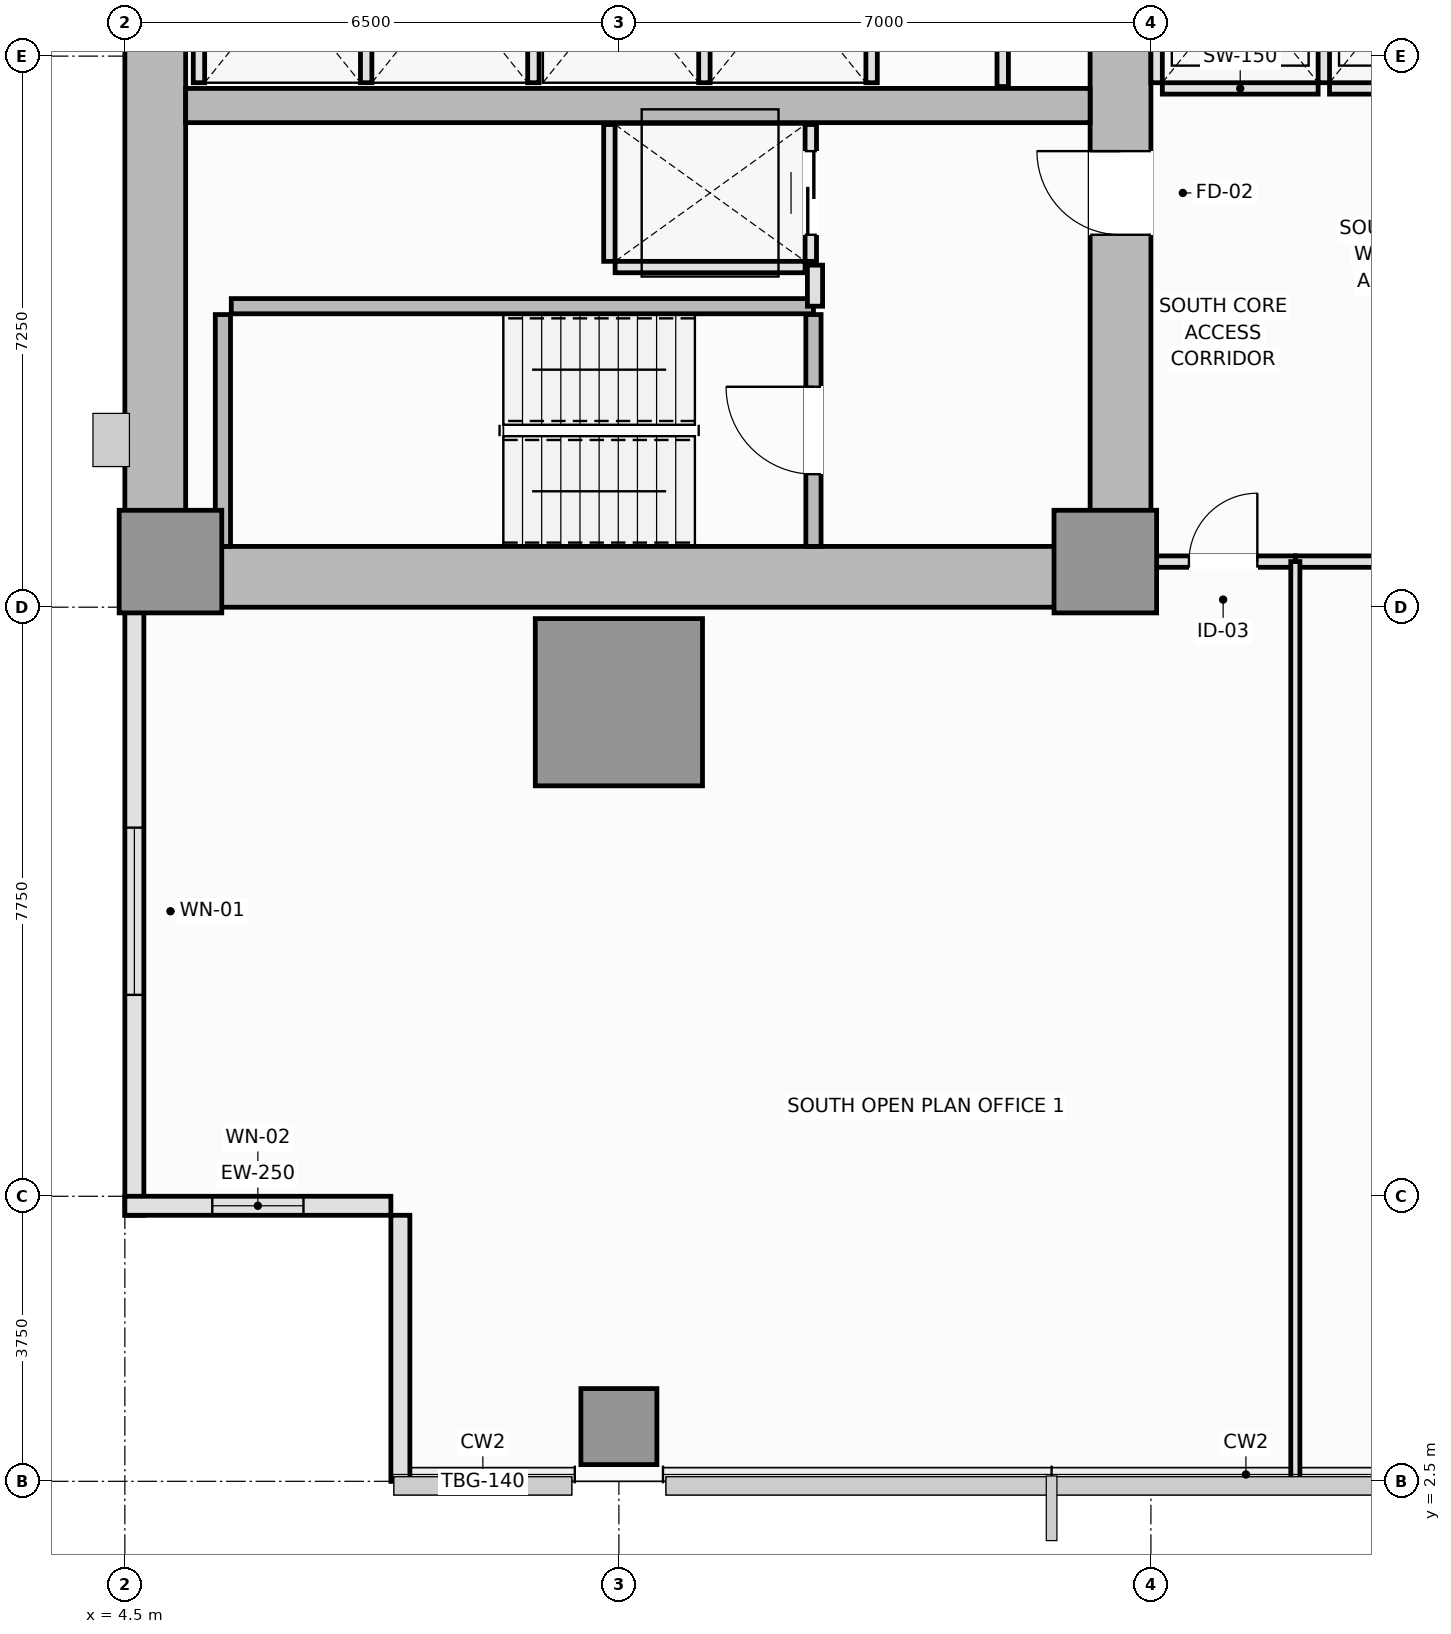
"""IFC4 building model, lengths in metres.
Left out: names, types, materials, properties, quantities, classifications, styles, units other than length and angle.
Written with IfcOpenShell. Run it as: python <this file> out.ifc"""

import sys

from ifc_helpers import new_model, si_unit, direction, frame, frame_2d, origin, origin_2d, place, context, subcontext, project, spatial, rectangle, extrude, element, fill, save


model = new_model("IFC4")
c1 = context("Model", 3, precision=1e-05, world=origin(), true_north=direction((0.0, 1.0)))
c2 = subcontext(c1, "Body", "Model", "MODEL_VIEW")
j1 = project(units=[si_unit("LENGTHUNIT", "METRE"), si_unit("PLANEANGLEUNIT", "RADIAN")], contexts=[c1])
p1 = place(None, origin())
s1 = spatial("IfcSite", under=j1, at=p1, CompositionType="ELEMENT")
p2 = place(p1, origin())
s2 = spatial("IfcBuilding", under=s1, at=p2, CompositionType="ELEMENT")
p3 = place(p2, frame((0.0, 0.0, 57.55)))
s3 = spatial("IfcBuildingStorey", under=s2, at=p3, CompositionType="ELEMENT", Elevation=57.55)
p4 = place(p3, frame((4.5, 14.4, 0.0), z_axis=(0.0, 0.0, 1.0), x_axis=(1.0, 0.0, 0.0)))
e1 = element("IfcWall", 1, at=p4, inside=s3, PredefinedType="SHEAR", context=c2, shape_type="SweptSolid", body=[
    extrude(rectangle(XDim=13.5, YDim=0.8, at=frame_2d((6.75, 0.0))), origin(), (0.0, 0.0, 1.0), 3.55),
])
p5 = place(p3, frame((4.9, 14.8, 0.0), z_axis=(0.0, 0.0, 1.0), x_axis=(0.0, 1.0, 0.0)))
e2 = element("IfcWall", 2, at=p5, inside=s3, PredefinedType="SHEAR", context=c2, shape_type="SweptSolid", body=[
    extrude(rectangle(XDim=20.9, YDim=0.8, at=frame_2d((10.45, 0.0))), origin(), (0.0, 0.0, 1.0), 3.55),
])
p6 = place(p3, frame((17.6, 14.8, 0.0), z_axis=(0.0, 0.0, 1.0), x_axis=(0.0, 1.0, 0.0)))
e3 = element("IfcWall", 3, at=p6, inside=s3, PredefinedType="SHEAR", context=c2, shape_type="SweptSolid", body=[
    extrude(rectangle(XDim=8.65, YDim=0.8, at=frame_2d((4.325, 0.0))), origin(), (0.0, 0.0, 1.0), 3.55),
])
p7 = place(p6, frame((4.1, 0.0, 0.0)))
e4 = element("IfcOpeningElement", 4, at=p7, cuts=e3, PredefinedType="OPENING", context=c2, shape_type="SweptSolid", body=[
    extrude(rectangle(XDim=1.1, YDim=2.15, at=frame_2d((0.55, 1.075))), frame((0.0, 0.41, 0.0), z_axis=(0.0, -1.0, 0.0), x_axis=(1.0, 0.0, 0.0)), (0.0, 0.0, 1.0), 0.82),
])
p8 = place(p3, frame((5.3, 20.6, 0.0), z_axis=(0.0, 0.0, 1.0), x_axis=(1.0, 0.0, 0.0)))
e5 = element("IfcWall", 5, at=p8, inside=s3, PredefinedType="SHEAR", context=c2, shape_type="SweptSolid", body=[
    extrude(rectangle(XDim=11.9, YDim=0.45, at=frame_2d((5.95, 0.0))), origin(), (0.0, 0.0, 1.0), 3.55),
])
for number, where, z_axis, x_axis in (
    (6, (5.1, 14.6, 0.0), (0.0, 0.0, 1.0), (1.0, 0.0, 0.0)),
    (7, (17.4, 14.6, 0.0), (0.0, 0.0, 1.0), (1.0, 0.0, 0.0)),
):
    element("IfcColumn", number, at=place(p3, frame(where, z_axis=z_axis, x_axis=x_axis)), inside=s3, PredefinedType="PILASTER", context=c2, shape_type="SweptSolid", body=[
        extrude(rectangle(XDim=1.35, YDim=1.35, at=origin_2d()), origin(), (0.0, 0.0, 1.0), 3.55),
    ])
p9 = place(p3, frame((11.0, 12.75, 0.0), z_axis=(0.0, 0.0, 1.0), x_axis=(1.0, 0.0, 0.0)))
e8 = element("IfcColumn", 8, at=p9, inside=s3, PredefinedType="COLUMN", context=c2, shape_type="SweptSolid", body=[
    extrude(rectangle(XDim=2.2, YDim=2.2, at=origin_2d()), origin(), (0.0, 0.0, 1.0), 3.55),
])
p10 = place(p3, frame((11.0, 3.22, 0.0), z_axis=(0.0, 0.0, 1.0), x_axis=(1.0, 0.0, 0.0)))
e9 = element("IfcColumn", 9, at=p10, inside=s3, PredefinedType="COLUMN", context=c2, shape_type="SweptSolid", body=[
    extrude(rectangle(XDim=1.0, YDim=1.0, at=origin_2d()), origin(), (0.0, 0.0, 1.0), 3.55),
])
p11 = place(p3, frame((4.625, 14.0, 0.0), z_axis=(0.0, 0.0, 1.0), x_axis=(0.0, -1.0, 0.0)))
e10 = element("IfcWall", 10, at=p11, inside=s3, PredefinedType="SOLIDWALL", context=c2, shape_type="SweptSolid", body=[
    extrude(rectangle(XDim=8.0, YDim=0.25, at=frame_2d((4.0, 0.0))), origin(), (0.0, 0.0, 1.0), 3.37),
])
p12 = place(p11, frame((2.9, 0.0, 0.9)))
e11 = element("IfcOpeningElement", 11, at=p12, cuts=e10, PredefinedType="OPENING", context=c2, shape_type="SweptSolid", body=[
    extrude(rectangle(XDim=2.2, YDim=1.8, at=frame_2d((1.1, 0.9))), frame((0.0, 0.135, 0.0), z_axis=(0.0, -1.0, 0.0), x_axis=(1.0, 0.0, 0.0)), (0.0, 0.0, 1.0), 0.27),
])
p13 = place(p3, frame((4.5, 6.125, 0.0), z_axis=(0.0, 0.0, 1.0), x_axis=(1.0, 0.0, 0.0)))
e12 = element("IfcWall", 12, at=p13, inside=s3, PredefinedType="SOLIDWALL", context=c2, shape_type="SweptSolid", body=[
    extrude(rectangle(XDim=3.5, YDim=0.25, at=frame_2d((1.75, 0.0))), origin(), (0.0, 0.0, 1.0), 3.37),
])
p14 = place(p13, frame((1.15, 0.0, 0.9)))
e13 = element("IfcOpeningElement", 13, at=p14, cuts=e12, PredefinedType="OPENING", context=c2, shape_type="SweptSolid", body=[
    extrude(rectangle(XDim=1.2, YDim=1.8, at=frame_2d((0.6, 0.9))), frame((0.0, 0.135, 0.0), z_axis=(0.0, -1.0, 0.0), x_axis=(1.0, 0.0, 0.0)), (0.0, 0.0, 1.0), 0.27),
])
p15 = place(p3, frame((8.125, 6.0, 0.0), z_axis=(0.0, 0.0, 1.0), x_axis=(0.0, -1.0, 0.0)))
e14 = element("IfcWall", 14, at=p15, inside=s3, PredefinedType="SOLIDWALL", context=c2, shape_type="SweptSolid", body=[
    extrude(rectangle(XDim=3.5, YDim=0.25, at=frame_2d((1.75, 0.0))), origin(), (0.0, 0.0, 1.0), 3.37),
])
p16 = place(p3, frame((5.79, 14.8, 0.0), z_axis=(0.0, 0.0, 1.0), x_axis=(0.0, 1.0, 0.0)))
e15 = element("IfcWall", 15, at=p16, inside=s3, PredefinedType="SOLIDWALL", context=c2, shape_type="SweptSolid", body=[
    extrude(rectangle(XDim=3.05, YDim=0.2, at=frame_2d((1.525, 0.0))), origin(), (0.0, 0.0, 1.0), 3.55),
])
p17 = place(p3, frame((5.9, 17.96, 0.0), z_axis=(0.0, 0.0, 1.0), x_axis=(1.0, 0.0, 0.0)))
e16 = element("IfcWall", 16, at=p17, inside=s3, PredefinedType="SOLIDWALL", context=c2, shape_type="SweptSolid", body=[
    extrude(rectangle(XDim=7.66, YDim=0.2, at=frame_2d((3.83, 0.0))), origin(), (0.0, 0.0, 1.0), 3.55),
])
p18 = place(p3, frame((13.56, 14.8, 0.0), z_axis=(0.0, 0.0, 1.0), x_axis=(0.0, 1.0, 0.0)))
e17 = element("IfcWall", 17, at=p18, inside=s3, PredefinedType="SOLIDWALL", context=c2, shape_type="SweptSolid", body=[
    extrude(rectangle(XDim=3.05, YDim=0.2, at=frame_2d((1.525, 0.0))), origin(), (0.0, 0.0, 1.0), 3.55),
])
p19 = place(p18, frame((0.95, 0.0, 0.0)))
e18 = element("IfcOpeningElement", 18, at=p19, cuts=e17, PredefinedType="OPENING", context=c2, shape_type="SweptSolid", body=[
    extrude(rectangle(XDim=1.15, YDim=2.15, at=frame_2d((0.575, 1.075))), frame((0.0, 0.11, 0.0), z_axis=(0.0, -1.0, 0.0), x_axis=(1.0, 0.0, 0.0)), (0.0, 0.0, 1.0), 0.22),
])
p20 = place(p3, frame((18.15, 20.825, 0.0), z_axis=(0.0, 0.0, 1.0), x_axis=(1.0, 0.0, 0.0)))
e19 = element("IfcWall", 19, at=p20, inside=s3, PredefinedType="PARTITIONING", context=c2, shape_type="SweptSolid", body=[
    extrude(rectangle(XDim=2.05, YDim=0.15, at=frame_2d((1.025, 0.0))), origin(), (0.0, 0.0, 1.0), 3.37),
])
for number, where, z_axis, x_axis in (
    (20, (18.075, 20.9, 0.0), (0.0, 0.0, 1.0), (0.0, 1.0, 0.0)),
    (21, (20.275, 20.9, 0.0), (0.0, 0.0, 1.0), (0.0, 1.0, 0.0)),
):
    element("IfcWall", number, at=place(p3, frame(where, z_axis=z_axis, x_axis=x_axis)), inside=s3, PredefinedType="PARTITIONING", context=c2, shape_type="SweptSolid", body=[
        extrude(rectangle(XDim=2.55, YDim=0.15, at=frame_2d((1.275, 0.0))), origin(), (0.0, 0.0, 1.0), 3.37),
    ])
p21 = place(p3, frame((20.35, 20.825, 0.0), z_axis=(0.0, 0.0, 1.0), x_axis=(1.0, 0.0, 0.0)))
e22 = element("IfcWall", 22, at=p21, inside=s3, PredefinedType="PARTITIONING", context=c2, shape_type="SweptSolid", body=[
    extrude(rectangle(XDim=2.05, YDim=0.15, at=frame_2d((1.025, 0.0))), origin(), (0.0, 0.0, 1.0), 3.37),
])
for number, where, z_axis, x_axis in (
    (23, (5.475, 20.9, 0.0), (0.0, 0.0, 1.0), (0.0, 1.0, 0.0)),
    (24, (7.675, 20.9, 0.0), (0.0, 0.0, 1.0), (0.0, 1.0, 0.0)),
    (25, (9.875, 20.9, 0.0), (0.0, 0.0, 1.0), (0.0, 1.0, 0.0)),
    (26, (12.125, 20.9, 0.0), (0.0, 0.0, 1.0), (0.0, 1.0, 0.0)),
    (27, (14.325, 20.9, 0.0), (0.0, 0.0, 1.0), (0.0, 1.0, 0.0)),
):
    element("IfcWall", number, at=place(p3, frame(where, z_axis=z_axis, x_axis=x_axis)), inside=s3, PredefinedType="PARTITIONING", context=c2, shape_type="SweptSolid", body=[
        extrude(rectangle(XDim=2.55, YDim=0.15, at=frame_2d((1.275, 0.0))), origin(), (0.0, 0.0, 1.0), 3.37),
    ])
p22 = place(p3, frame((10.95, 18.475, 0.0), z_axis=(0.0, 0.0, 1.0), x_axis=(1.0, 0.0, 0.0)))
e28 = element("IfcWall", 28, at=p22, inside=s3, PredefinedType="PARTITIONING", context=c2, shape_type="SweptSolid", body=[
    extrude(rectangle(XDim=2.5, YDim=0.15, at=frame_2d((1.25, 0.0))), origin(), (0.0, 0.0, 1.0), 3.37),
])
p23 = place(p3, frame((10.875, 18.55, 0.0), z_axis=(0.0, 0.0, 1.0), x_axis=(0.0, 1.0, 0.0)))
e29 = element("IfcWall", 29, at=p23, inside=s3, PredefinedType="PARTITIONING", context=c2, shape_type="SweptSolid", body=[
    extrude(rectangle(XDim=1.8, YDim=0.15, at=frame_2d((0.9, 0.0))), origin(), (0.0, 0.0, 1.0), 3.37),
])
p24 = place(p3, frame((13.525, 18.55, 0.0), z_axis=(0.0, 0.0, 1.0), x_axis=(0.0, 1.0, 0.0)))
e30 = element("IfcWall", 30, at=p24, inside=s3, PredefinedType="PARTITIONING", context=c2, shape_type="SweptSolid", body=[
    extrude(rectangle(XDim=1.8, YDim=0.15, at=frame_2d((0.9, 0.0))), origin(), (0.0, 0.0, 1.0), 3.37),
])
p25 = place(p24, frame((0.35, 0.0, 0.0)))
e31 = element("IfcOpeningElement", 31, at=p25, cuts=e30, PredefinedType="OPENING", context=c2, shape_type="SweptSolid", body=[
    extrude(rectangle(XDim=1.1, YDim=2.2, at=frame_2d((0.55, 1.1))), frame((0.0, 0.085, 0.0), z_axis=(0.0, -1.0, 0.0), x_axis=(1.0, 0.0, 0.0)), (0.0, 0.0, 1.0), 0.17),
])
p26 = place(p3, frame((13.58, 17.96, 0.0), z_axis=(0.0, 0.0, 1.0), x_axis=(0.0, 1.0, 0.0)))
e32 = element("IfcWall", 32, at=p26, inside=s3, PredefinedType="PARTITIONING", context=c2, shape_type="SweptSolid", body=[
    extrude(rectangle(XDim=0.54, YDim=0.2, at=frame_2d((0.27, 0.0))), origin(), (0.0, 0.0, 1.0), 3.37),
])
p27 = place(p3, frame((16.05, 20.85, 0.0), z_axis=(0.0, 0.0, 1.0), x_axis=(0.0, 1.0, 0.0)))
e33 = element("IfcWall", 33, at=p27, inside=s3, PredefinedType="PARTITIONING", context=c2, shape_type="SweptSolid", body=[
    extrude(rectangle(XDim=2.67, YDim=0.15, at=frame_2d((1.335, 0.0))), origin(), (0.0, 0.0, 1.0), 3.37),
])
p28 = place(p27, frame((0.885, 0.0, 0.0)))
e34 = element("IfcOpeningElement", 34, at=p28, cuts=e33, PredefinedType="OPENING", context=c2, shape_type="SweptSolid", body=[
    extrude(rectangle(XDim=0.9, YDim=2.1, at=frame_2d((0.45, 1.05))), frame((0.0, 0.085, 0.0), z_axis=(0.0, -1.0, 0.0), x_axis=(1.0, 0.0, 0.0)), (0.0, 0.0, 1.0), 0.17),
])
p29 = place(p3, frame((18.0, 14.6, 0.0), z_axis=(0.0, 0.0, 1.0), x_axis=(1.0, 0.0, 0.0)))
e35 = element("IfcWall", 35, at=p29, inside=s3, PredefinedType="PARTITIONING", context=c2, shape_type="SweptSolid", body=[
    extrude(rectangle(XDim=1.9, YDim=0.15, at=frame_2d((0.95, 0.0))), origin(), (0.0, 0.0, 1.0), 3.37),
])
p30 = place(p29, frame((0.5, 0.0, 0.0)))
e36 = element("IfcOpeningElement", 36, at=p30, cuts=e35, PredefinedType="OPENING", context=c2, shape_type="SweptSolid", body=[
    extrude(rectangle(XDim=0.9, YDim=2.1, at=frame_2d((0.45, 1.05))), frame((0.0, 0.085, 0.0), z_axis=(0.0, -1.0, 0.0), x_axis=(1.0, 0.0, 0.0)), (0.0, 0.0, 1.0), 0.17),
])
p31 = place(p3, frame((19.9, 14.6, 0.0), z_axis=(0.0, 0.0, 1.0), x_axis=(1.0, 0.0, 0.0)))
e37 = element("IfcWall", 37, at=p31, inside=s3, PredefinedType="PARTITIONING", context=c2, shape_type="SweptSolid", body=[
    extrude(rectangle(XDim=3.7, YDim=0.15, at=frame_2d((1.85, 0.0))), origin(), (0.0, 0.0, 1.0), 3.37),
])
p32 = place(p31, frame((1.35, 0.0, 0.0)))
e38 = element("IfcOpeningElement", 38, at=p32, cuts=e37, PredefinedType="OPENING", context=c2, shape_type="SweptSolid", body=[
    extrude(rectangle(XDim=1.0, YDim=2.15, at=frame_2d((0.5, 1.075))), frame((0.0, 0.085, 0.0), z_axis=(0.0, -1.0, 0.0), x_axis=(1.0, 0.0, 0.0)), (0.0, 0.0, 1.0), 0.17),
])
p33 = place(p3, frame((19.9, 2.51, 0.0), z_axis=(0.0, 0.0, 1.0), x_axis=(0.0, 1.0, 0.0)))
e39 = element("IfcWall", 39, at=p33, inside=s3, PredefinedType="PARTITIONING", context=c2, shape_type="SweptSolid", body=[
    extrude(rectangle(XDim=12.09, YDim=0.12, at=frame_2d((6.045, 0.0))), origin(), (0.0, 0.0, 1.0), 3.37),
])
p34 = place(p12, origin())
e40 = element("IfcWindow", 40, at=p34, inside=s3, PartitioningType="SINGLE_PANEL", PredefinedType="WINDOW", context=c2, shape_type="SweptSolid", body=[
    extrude(rectangle(XDim=2.2, YDim=1.8, at=frame_2d((1.1, 0.9))), frame((0.0, 0.03, 0.0), z_axis=(0.0, -1.0, 0.0), x_axis=(1.0, 0.0, 0.0)), (0.0, 0.0, 1.0), 0.06),
])
fill(e11, e40)
p35 = place(p14, origin())
e41 = element("IfcWindow", 41, at=p35, inside=s3, PartitioningType="SINGLE_PANEL", PredefinedType="WINDOW", context=c2, shape_type="SweptSolid", body=[
    extrude(rectangle(XDim=1.2, YDim=1.8, at=frame_2d((0.6, 0.9))), frame((0.0, 0.03, 0.0), z_axis=(0.0, -1.0, 0.0), x_axis=(1.0, 0.0, 0.0)), (0.0, 0.0, 1.0), 0.06),
])
fill(e13, e41)
p36 = place(p19, origin())
e42 = element("IfcDoor", 42, at=p36, inside=s3, OperationType="SINGLE_SWING_RIGHT", PredefinedType="DOOR", context=c2, shape_type="SweptSolid", body=[
    extrude(rectangle(XDim=1.15, YDim=2.15, at=frame_2d((0.575, 1.075))), frame((0.0, 0.025, 0.0), z_axis=(0.0, -1.0, 0.0), x_axis=(1.0, 0.0, 0.0)), (0.0, 0.0, 1.0), 0.05),
])
fill(e18, e42)
p37 = place(p25, origin())
e43 = element("IfcDoor", 43, at=p37, inside=s3, OperationType="DOUBLE_DOOR_SLIDING", PredefinedType="DOOR", context=c2, shape_type="SweptSolid", body=[
    extrude(rectangle(XDim=1.1, YDim=2.2, at=frame_2d((0.55, 1.1))), frame((0.0, 0.025, 0.0), z_axis=(0.0, -1.0, 0.0), x_axis=(1.0, 0.0, 0.0)), (0.0, 0.0, 1.0), 0.05),
])
fill(e31, e43)
p38 = place(p7, origin())
e44 = element("IfcDoor", 44, at=p38, inside=s3, OperationType="SINGLE_SWING_RIGHT", PredefinedType="DOOR", context=c2, shape_type="SweptSolid", body=[
    extrude(rectangle(XDim=1.1, YDim=2.15, at=frame_2d((0.55, 1.075))), frame((0.0, 0.025, 0.0), z_axis=(0.0, -1.0, 0.0), x_axis=(1.0, 0.0, 0.0)), (0.0, 0.0, 1.0), 0.05),
])
fill(e4, e44)
p39 = place(p30, origin())
e45 = element("IfcDoor", 45, at=p39, inside=s3, OperationType="SINGLE_SWING_RIGHT", PredefinedType="DOOR", context=c2, shape_type="SweptSolid", body=[
    extrude(rectangle(XDim=0.9, YDim=2.1, at=frame_2d((0.45, 1.05))), frame((0.0, 0.025, 0.0), z_axis=(0.0, -1.0, 0.0), x_axis=(1.0, 0.0, 0.0)), (0.0, 0.0, 1.0), 0.05),
])
fill(e36, e45)
save(model, sys.argv[1])
